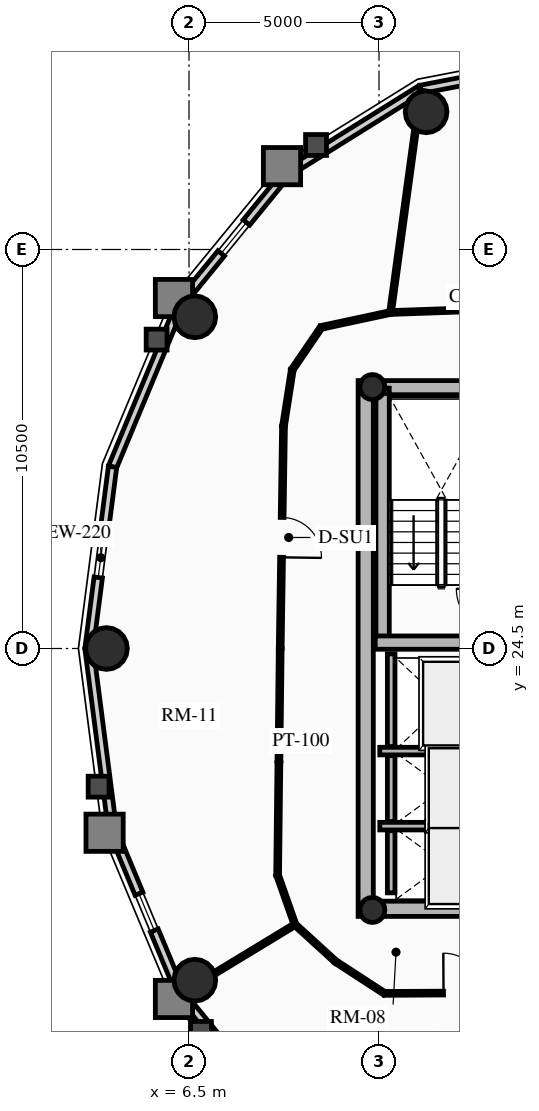
"""IFC4 building model, lengths in metres.
Left out: names, types, materials, properties, quantities, classifications, styles, units other than length and angle.
Written with IfcOpenShell. Run it as: python <this file> out.ifc"""

import sys

from ifc_helpers import new_model, si_unit, direction, frame, frame_2d, origin, origin_2d, place, context, subcontext, project, spatial, rectangle, circle, hollow_circle, extrude, source, transform, mapped, element, fill, save


model = new_model("IFC4")
c1 = context("Model", 3, precision=1e-05, world=origin(), true_north=direction((0.0, 1.0)))
c2 = subcontext(c1, "Body", "Model", "MODEL_VIEW")
j1 = project(units=[si_unit("LENGTHUNIT", "METRE"), si_unit("PLANEANGLEUNIT", "RADIAN")], contexts=[c1])
p1 = place(None, origin())
s1 = spatial("IfcSite", under=j1, at=p1, CompositionType="ELEMENT")
p2 = place(p1, origin())
s2 = spatial("IfcBuilding", under=s1, at=p2, CompositionType="ELEMENT")
p3 = place(p2, frame((0.0, 0.0, 196.66)))
s3 = spatial("IfcBuildingStorey", under=s2, at=p3, CompositionType="ELEMENT", Elevation=196.66)
p4 = place(p3, frame((11.15, 17.45, 0.0), z_axis=(0.0, 0.0, 1.0), x_axis=(0.0, 1.0, 0.0)))
e1 = element("IfcWall", 1, at=p4, inside=s3, PredefinedType="SHEAR", context=c2, shape_type="SweptSolid", body=[
    extrude(rectangle(XDim=14.1, YDim=0.4, at=frame_2d((7.05, 0.0))), origin(), (0.0, 0.0, 1.0), 2.91),
])
p5 = place(p3, frame((11.15, 17.65, 0.0), z_axis=(0.0, 0.0, 1.0), x_axis=(1.0, 0.0, 0.0)))
e2 = element("IfcWall", 2, at=p5, inside=s3, PredefinedType="SHEAR", context=c2, shape_type="SweptSolid", body=[
    extrude(rectangle(XDim=10.7, YDim=0.4, at=frame_2d((5.35, 0.0))), origin(), (0.0, 0.0, 1.0), 2.91),
])
m1 = source(origin(), c2, "Body", "SweptSolid", [
    extrude(rectangle(XDim=1.5, YDim=2.02, at=frame_2d((0.75, 1.01))), frame((0.0, 0.21, 0.0), z_axis=(0.0, -1.0, 0.0), x_axis=(1.0, 0.0, 0.0)), (0.0, 0.0, 1.0), 0.42),
])
p6 = place(p5, frame((5.45, 0.0, 0.0)))
e3 = element("IfcOpeningElement", 3, at=p6, cuts=e2, PredefinedType="OPENING", context=c2, shape_type="MappedRepresentation", body=[
    mapped(m1, transform((0.0, 0.0, 0.0), x_axis=(1.0, 0.0, 0.0), y_axis=(0.0, 1.0, 0.0), z_axis=(0.0, 0.0, 1.0), scale=1.0)),
])
p7 = place(p3, frame((11.15, 31.35, 0.0), z_axis=(0.0, 0.0, 1.0), x_axis=(1.0, 0.0, 0.0)))
e4 = element("IfcWall", 4, at=p7, inside=s3, PredefinedType="SHEAR", context=c2, shape_type="SweptSolid", body=[
    extrude(rectangle(XDim=10.7, YDim=0.4, at=frame_2d((5.35, 0.0))), origin(), (0.0, 0.0, 1.0), 2.91),
])
p8 = place(p7, frame((4.6, 0.0, 0.0)))
e5 = element("IfcOpeningElement", 5, at=p8, cuts=e4, PredefinedType="OPENING", context=c2, shape_type="MappedRepresentation", body=[
    mapped(m1, transform((0.0, 0.0, 0.0), x_axis=(1.0, 0.0, 0.0), y_axis=(0.0, 1.0, 0.0), z_axis=(0.0, 0.0, 1.0), scale=1.0)),
])
p9 = place(p3, frame((11.595, 24.655, 0.0), z_axis=(0.0, 0.0, 1.0), x_axis=(0.0, 1.0, 0.0)))
e6 = element("IfcWall", 6, at=p9, inside=s3, PredefinedType="SHEAR", context=c2, shape_type="SweptSolid", body=[
    extrude(rectangle(XDim=6.695, YDim=0.35, at=frame_2d((3.348, 0.0))), origin(), (0.0, 0.0, 1.0), 2.91),
])
p10 = place(p3, frame((11.4, 24.655, 0.0), z_axis=(0.0, 0.0, 1.0), x_axis=(1.0, 0.0, 0.0)))
e7 = element("IfcWall", 7, at=p10, inside=s3, PredefinedType="SHEAR", context=c2, shape_type="SweptSolid", body=[
    extrude(rectangle(XDim=3.285, YDim=0.35, at=frame_2d((1.643, 0.0))), origin(), (0.0, 0.0, 1.0), 2.91),
])
for number, where, z_axis, x_axis in (
    (8, (11.325, 17.62, 0.0), (0.0, 0.0, 1.0), (1.0, 0.0, 0.0)),
    (9, (11.325, 31.38, 0.0), (0.0, 0.0, 1.0), (1.0, 0.0, 0.0)),
):
    element("IfcColumn", number, at=place(p3, frame(where, z_axis=z_axis, x_axis=x_axis)), inside=s3, PredefinedType="COLUMN", context=c2, shape_type="SweptSolid", body=[
        extrude(hollow_circle(Radius=0.33, WallThickness=0.025, at=origin_2d()), origin(), (0.0, 0.0, 1.0), 2.91),
    ])
for number, where, z_axis, x_axis in (
    (10, (12.739, 38.623, 0.0), (0.0, 0.0, 1.0), (1.0, 0.0, 0.0)),
    (11, (6.653, 33.229, 0.0), (0.0, 0.0, 1.0), (1.0, 0.0, 0.0)),
    (12, (4.328, 24.5, 0.0), (0.0, 0.0, 1.0), (1.0, 0.0, 0.0)),
    (13, (6.653, 15.771, 0.0), (0.0, 0.0, 1.0), (1.0, 0.0, 0.0)),
):
    element("IfcColumn", number, at=place(p3, frame(where, z_axis=z_axis, x_axis=x_axis)), inside=s3, PredefinedType="USERDEFINED", context=c2, shape_type="SweptSolid", body=[
        extrude(circle(Radius=0.55, at=origin_2d()), origin(), (0.0, 0.0, 1.0), 2.91),
    ])
p11 = place(p3, frame((12.597, 39.213, 0.0), z_axis=(0.0, 0.0, 1.0), x_axis=(0.981700307484, 0.190432419211, 0.0)))
e14 = element("IfcWall", 14, at=p11, inside=s3, PredefinedType="SOLIDWALL", context=c2, shape_type="SweptSolid", body=[
    extrude(rectangle(XDim=3.976, YDim=0.22, at=frame_2d((1.988, 0.0))), origin(), (0.0, 0.0, 1.0), 2.322),
])
m2 = source(origin(), c2, "Body", "SweptSolid", [
    extrude(rectangle(XDim=1.05, YDim=1.3, at=frame_2d((0.525, 0.65))), frame((0.0, 0.12, 0.0), z_axis=(0.0, -1.0, 0.0), x_axis=(1.0, 0.0, 0.0)), (0.0, 0.0, 1.0), 0.24),
])
p12 = place(p11, frame((1.463, 0.0, 0.65)))
e15 = element("IfcOpeningElement", 15, at=p12, cuts=e14, PredefinedType="OPENING", context=c2, shape_type="MappedRepresentation", body=[
    mapped(m2, transform((0.0, 0.0, 0.0), x_axis=(1.0, 0.0, 0.0), y_axis=(0.0, 1.0, 0.0), z_axis=(0.0, 0.0, 1.0), scale=1.0)),
])
p13 = place(p3, frame((9.076, 37.015, 0.0), z_axis=(0.0, 0.0, 1.0), x_axis=(0.848318713376, 0.529485939886, 0.0)))
e16 = element("IfcWall", 16, at=p13, inside=s3, PredefinedType="SOLIDWALL", context=c2, shape_type="SweptSolid", body=[
    extrude(rectangle(XDim=4.15, YDim=0.22, at=frame_2d((2.075, 0.0))), origin(), (0.0, 0.0, 1.0), 2.322),
])
p14 = place(p3, frame((6.282, 33.593, 0.0), z_axis=(0.0, 0.0, 1.0), x_axis=(0.632467166636, 0.774587169483, 0.0)))
e17 = element("IfcWall", 17, at=p14, inside=s3, PredefinedType="SOLIDWALL", context=c2, shape_type="SweptSolid", body=[
    extrude(rectangle(XDim=4.418, YDim=0.22, at=frame_2d((2.209, 0.0))), origin(), (0.0, 0.0, 1.0), 2.322),
])
p15 = place(p14, frame((1.684, 0.0, 0.65)))
e18 = element("IfcOpeningElement", 18, at=p15, cuts=e17, PredefinedType="OPENING", context=c2, shape_type="MappedRepresentation", body=[
    mapped(m2, transform((0.0, 0.0, 0.0), x_axis=(1.0, 0.0, 0.0), y_axis=(0.0, 1.0, 0.0), z_axis=(0.0, 0.0, 1.0), scale=1.0)),
])
p16 = place(p3, frame((4.488, 29.281, 0.0), z_axis=(0.0, 0.0, 1.0), x_axis=(0.384036305194, 0.923317993052, 0.0)))
e19 = element("IfcWall", 19, at=p16, inside=s3, PredefinedType="SOLIDWALL", context=c2, shape_type="SweptSolid", body=[
    extrude(rectangle(XDim=4.671, YDim=0.22, at=frame_2d((2.335, 0.0))), origin(), (0.0, 0.0, 1.0), 2.322),
])
p17 = place(p3, frame((3.87, 24.5, 0.0), z_axis=(0.0, 0.0, 1.0), x_axis=(0.128241318541, 0.991742993027, 0.0)))
e20 = element("IfcWall", 20, at=p17, inside=s3, PredefinedType="SOLIDWALL", context=c2, shape_type="SweptSolid", body=[
    extrude(rectangle(XDim=4.82, YDim=0.22, at=frame_2d((2.41, 0.0))), origin(), (0.0, 0.0, 1.0), 2.322),
])
p18 = place(p17, frame((1.885, 0.0, 0.65)))
e21 = element("IfcOpeningElement", 21, at=p18, cuts=e20, PredefinedType="OPENING", context=c2, shape_type="MappedRepresentation", body=[
    mapped(m2, transform((0.0, 0.0, 0.0), x_axis=(1.0, 0.0, 0.0), y_axis=(0.0, 1.0, 0.0), z_axis=(0.0, 0.0, 1.0), scale=1.0)),
])
p19 = place(p3, frame((4.488, 19.719, 0.0), z_axis=(0.0, 0.0, 1.0), x_axis=(-0.128241318541, 0.991742993027, 0.0)))
e22 = element("IfcWall", 22, at=p19, inside=s3, PredefinedType="SOLIDWALL", context=c2, shape_type="SweptSolid", body=[
    extrude(rectangle(XDim=4.82, YDim=0.22, at=frame_2d((2.41, 0.0))), origin(), (0.0, 0.0, 1.0), 2.322),
])
p20 = place(p3, frame((6.282, 15.407, 0.0), z_axis=(0.0, 0.0, 1.0), x_axis=(-0.384036305194, 0.923317993052, 0.0)))
e23 = element("IfcWall", 23, at=p20, inside=s3, PredefinedType="SOLIDWALL", context=c2, shape_type="SweptSolid", body=[
    extrude(rectangle(XDim=4.671, YDim=0.22, at=frame_2d((2.335, 0.0))), origin(), (0.0, 0.0, 1.0), 2.322),
])
p21 = place(p20, frame((1.81, 0.0, 0.65)))
e24 = element("IfcOpeningElement", 24, at=p21, cuts=e23, PredefinedType="OPENING", context=c2, shape_type="MappedRepresentation", body=[
    mapped(m2, transform((0.0, 0.0, 0.0), x_axis=(1.0, 0.0, 0.0), y_axis=(0.0, 1.0, 0.0), z_axis=(0.0, 0.0, 1.0), scale=1.0)),
])
p22 = place(p3, frame((9.076, 11.985, 0.0), z_axis=(0.0, 0.0, 1.0), x_axis=(-0.632467166636, 0.774587169483, 0.0)))
e25 = element("IfcWall", 25, at=p22, inside=s3, PredefinedType="SOLIDWALL", context=c2, shape_type="SweptSolid", body=[
    extrude(rectangle(XDim=4.418, YDim=0.22, at=frame_2d((2.209, 0.0))), origin(), (0.0, 0.0, 1.0), 2.322),
])
p23 = place(p3, frame((11.52, 21.8, 0.0), z_axis=(0.0, 0.0, 1.0), x_axis=(1.0, 0.0, 0.0)))
e26 = element("IfcWall", 26, at=p23, inside=s3, PredefinedType="SHEAR", context=c2, shape_type="SweptSolid", body=[
    extrude(rectangle(XDim=2.97, YDim=0.2, at=frame_2d((1.485, 0.0))), origin(), (0.0, 0.0, 1.0), 2.91),
])
p24 = place(p3, frame((11.82, 21.92, 0.0), z_axis=(0.0, 0.0, 1.0), x_axis=(0.0, 1.0, 0.0)))
e27 = element("IfcWall", 27, at=p24, inside=s3, PredefinedType="SHEAR", context=c2, shape_type="SweptSolid", body=[
    extrude(rectangle(XDim=2.44, YDim=0.2, at=frame_2d((1.22, 0.0))), origin(), (0.0, 0.0, 1.0), 2.91),
])
p25 = place(p3, frame((11.52, 19.825, 0.0), z_axis=(0.0, 0.0, 1.0), x_axis=(1.0, 0.0, 0.0)))
e28 = element("IfcWall", 28, at=p25, inside=s3, PredefinedType="SHEAR", context=c2, shape_type="SweptSolid", body=[
    extrude(rectangle(XDim=2.97, YDim=0.2, at=frame_2d((1.485, 0.0))), origin(), (0.0, 0.0, 1.0), 2.91),
])
p26 = place(p3, frame((11.82, 19.945, 0.0), z_axis=(0.0, 0.0, 1.0), x_axis=(0.0, 1.0, 0.0)))
e29 = element("IfcWall", 29, at=p26, inside=s3, PredefinedType="SHEAR", context=c2, shape_type="SweptSolid", body=[
    extrude(rectangle(XDim=1.735, YDim=0.2, at=frame_2d((0.867, 0.0))), origin(), (0.0, 0.0, 1.0), 2.91),
])
p27 = place(p3, frame((11.82, 18.07, 0.0), z_axis=(0.0, 0.0, 1.0), x_axis=(0.0, 1.0, 0.0)))
e30 = element("IfcWall", 30, at=p27, inside=s3, PredefinedType="SHEAR", context=c2, shape_type="SweptSolid", body=[
    extrude(rectangle(XDim=1.635, YDim=0.2, at=frame_2d((0.817, 0.0))), origin(), (0.0, 0.0, 1.0), 2.91),
])
p28 = place(p3, frame((18.082, 33.56, 0.0), z_axis=(0.0, 0.0, 1.0), x_axis=(-0.999399009709, -0.034664382185, 0.0)))
e31 = element("IfcWall", 31, at=p28, inside=s3, PredefinedType="MOVABLE", context=c2, shape_type="SweptSolid", body=[
    extrude(rectangle(XDim=6.282, YDim=0.1, at=frame_2d((3.141, 0.0))), origin(), (0.0, 0.0, 1.0), 2.255),
])
p29 = place(p3, frame((11.803, 33.342, 0.0), z_axis=(0.0, 0.0, 1.0), x_axis=(-0.977750742783, -0.209770076483, 0.0)))
e32 = element("IfcWall", 32, at=p29, inside=s3, PredefinedType="MOVABLE", context=c2, shape_type="SweptSolid", body=[
    extrude(rectangle(XDim=1.868, YDim=0.1, at=frame_2d((0.934, 0.0))), origin(), (0.0, 0.0, 1.0), 2.255),
])
p30 = place(p3, frame((9.977, 32.95, 0.0), z_axis=(0.0, 0.0, 1.0), x_axis=(-0.563291804539, -0.826258036535, 0.0)))
e33 = element("IfcWall", 33, at=p30, inside=s3, PredefinedType="MOVABLE", context=c2, shape_type="SweptSolid", body=[
    extrude(rectangle(XDim=1.346, YDim=0.1, at=frame_2d((0.673, 0.0))), origin(), (0.0, 0.0, 1.0), 2.322),
])
p31 = place(p3, frame((9.219, 31.838, 0.0), z_axis=(0.0, 0.0, 1.0), x_axis=(-0.154065528966, -0.98806063214, 0.0)))
e34 = element("IfcWall", 34, at=p31, inside=s3, PredefinedType="MOVABLE", context=c2, shape_type="SweptSolid", body=[
    extrude(rectangle(XDim=1.507, YDim=0.1, at=frame_2d((0.753, 0.0))), origin(), (0.0, 0.0, 1.0), 2.255),
])
p32 = place(p3, frame((8.986, 30.349, 0.0), z_axis=(0.0, 0.0, 1.0), x_axis=(-0.014775478218, -0.999890836663, 0.0)))
e35 = element("IfcWall", 35, at=p32, inside=s3, PredefinedType="MOVABLE", context=c2, shape_type="SweptSolid", body=[
    extrude(rectangle(XDim=5.849, YDim=0.1, at=frame_2d((2.925, 0.0))), origin(), (0.0, 0.0, 1.0), 2.685),
])
m3 = source(origin(), c2, "Body", "SweptSolid", [
    extrude(rectangle(XDim=1.05, YDim=2.015, at=frame_2d((0.525, 1.007))), frame((0.0, 0.06, 0.0), z_axis=(0.0, -1.0, 0.0), x_axis=(1.0, 0.0, 0.0)), (0.0, 0.0, 1.0), 0.12),
])
p33 = place(p32, frame((2.4, 0.0, 0.0)))
e36 = element("IfcOpeningElement", 36, at=p33, cuts=e35, PredefinedType="OPENING", context=c2, shape_type="MappedRepresentation", body=[
    mapped(m3, transform((0.0, 0.0, 0.0), x_axis=(1.0, 0.0, 0.0), y_axis=(0.0, 1.0, 0.0), z_axis=(0.0, 0.0, 1.0), scale=1.0)),
])
p34 = place(p3, frame((8.9, 24.5, 0.0), z_axis=(0.0, 0.0, 1.0), x_axis=(-0.011416369353, -0.999934831132, 0.0)))
e37 = element("IfcWall", 37, at=p34, inside=s3, PredefinedType="MOVABLE", context=c2, shape_type="SweptSolid", body=[
    extrude(rectangle(XDim=5.967, YDim=0.1, at=frame_2d((2.983, 0.0))), origin(), (0.0, 0.0, 1.0), 2.322),
])
p35 = place(p3, frame((8.832, 18.534, 0.0), z_axis=(0.0, 0.0, 1.0), x_axis=(0.332031819657, -0.943268186008, 0.0)))
e38 = element("IfcWall", 38, at=p35, inside=s3, PredefinedType="MOVABLE", context=c2, shape_type="SweptSolid", body=[
    extrude(rectangle(XDim=1.377, YDim=0.1, at=frame_2d((0.688, 0.0))), origin(), (0.0, 0.0, 1.0), 2.255),
])
p36 = place(p3, frame((9.289, 17.235, 0.0), z_axis=(0.0, 0.0, 1.0), x_axis=(0.739015164946, -0.673688790155, 0.0)))
e39 = element("IfcWall", 39, at=p36, inside=s3, PredefinedType="MOVABLE", context=c2, shape_type="SweptSolid", body=[
    extrude(rectangle(XDim=1.446, YDim=0.1, at=frame_2d((0.723, 0.0))), origin(), (0.0, 0.0, 1.0), 2.322),
])
p37 = place(p3, frame((10.358, 16.26, 0.0), z_axis=(0.0, 0.0, 1.0), x_axis=(0.838265397059, -0.545262435983, 0.0)))
e40 = element("IfcWall", 40, at=p37, inside=s3, PredefinedType="MOVABLE", context=c2, shape_type="SweptSolid", body=[
    extrude(rectangle(XDim=1.534, YDim=0.1, at=frame_2d((0.767, 0.0))), origin(), (0.0, 0.0, 1.0), 2.255),
])
p38 = place(p3, frame((11.644, 15.424, 0.0), z_axis=(0.0, 0.0, 1.0), x_axis=(0.999986552511, 0.005186019339, 0.0)))
e41 = element("IfcWall", 41, at=p38, inside=s3, PredefinedType="MOVABLE", context=c2, shape_type="SweptSolid", body=[
    extrude(rectangle(XDim=3.201, YDim=0.1, at=frame_2d((1.601, 0.0))), origin(), (0.0, 0.0, 1.0), 2.322),
])
p39 = place(p38, frame((1.553, 0.0, 0.0)))
e42 = element("IfcOpeningElement", 42, at=p39, cuts=e41, PredefinedType="OPENING", context=c2, shape_type="MappedRepresentation", body=[
    mapped(m3, transform((0.0, 0.0, 0.0), x_axis=(1.0, 0.0, 0.0), y_axis=(0.0, 1.0, 0.0), z_axis=(0.0, 0.0, 1.0), scale=1.0)),
])
p40 = place(p3, frame((11.803, 33.342, 0.0), z_axis=(0.0, 0.0, 1.0), x_axis=(0.135452591041, 0.990783828885, 0.0)))
e43 = element("IfcWall", 43, at=p40, inside=s3, PredefinedType="MOVABLE", context=c2, shape_type="SweptSolid", body=[
    extrude(rectangle(XDim=5.906, YDim=0.1, at=frame_2d((2.953, 0.0))), origin(), (0.0, 0.0, 1.0), 2.322),
])
p41 = place(p3, frame((9.289, 17.235, 0.0), z_axis=(0.0, 0.0, 1.0), x_axis=(-0.854741081983, -0.519054604806, 0.0)))
e44 = element("IfcWall", 44, at=p41, inside=s3, PredefinedType="MOVABLE", context=c2, shape_type="SweptSolid", body=[
    extrude(rectangle(XDim=3.499, YDim=0.1, at=frame_2d((1.75, 0.0))), origin(), (0.0, 0.0, 1.0), 2.322),
])
m4 = source(origin(), c2, "Body", "SweptSolid", [
    extrude(rectangle(XDim=1.05, YDim=1.3, at=frame_2d((0.525, 0.65))), frame((0.0, 0.03, 0.0), z_axis=(0.0, -1.0, 0.0), x_axis=(1.0, 0.0, 0.0)), (0.0, 0.0, 1.0), 0.06),
])
p42 = place(p15, origin())
e45 = element("IfcWindow", 45, at=p42, inside=s3, PartitioningType="SINGLE_PANEL", PredefinedType="WINDOW", context=c2, shape_type="MappedRepresentation", body=[
    mapped(m4, transform((0.0, 0.0, 0.0), x_axis=(1.0, 0.0, 0.0), y_axis=(0.0, 1.0, 0.0), z_axis=(0.0, 0.0, 1.0), scale=1.0)),
])
fill(e18, e45)
p43 = place(p18, origin())
e46 = element("IfcWindow", 46, at=p43, inside=s3, PartitioningType="SINGLE_PANEL", PredefinedType="WINDOW", context=c2, shape_type="MappedRepresentation", body=[
    mapped(m4, transform((0.0, 0.0, 0.0), x_axis=(1.0, 0.0, 0.0), y_axis=(0.0, 1.0, 0.0), z_axis=(0.0, 0.0, 1.0), scale=1.0)),
])
fill(e21, e46)
p44 = place(p21, origin())
e47 = element("IfcWindow", 47, at=p44, inside=s3, PartitioningType="SINGLE_PANEL", PredefinedType="WINDOW", context=c2, shape_type="MappedRepresentation", body=[
    mapped(m4, transform((0.0, 0.0, 0.0), x_axis=(1.0, 0.0, 0.0), y_axis=(0.0, 1.0, 0.0), z_axis=(0.0, 0.0, 1.0), scale=1.0)),
])
fill(e24, e47)
m5 = source(origin(), c2, "Body", "SweptSolid", [
    extrude(rectangle(XDim=1.05, YDim=2.015, at=frame_2d((0.525, 1.007))), frame((0.0, 0.025, 0.0), z_axis=(0.0, -1.0, 0.0), x_axis=(1.0, 0.0, 0.0)), (0.0, 0.0, 1.0), 0.05),
])
p45 = place(p33, origin())
e48 = element("IfcDoor", 48, at=p45, inside=s3, OperationType="SINGLE_SWING_RIGHT", PredefinedType="DOOR", context=c2, shape_type="MappedRepresentation", body=[
    mapped(m5, transform((0.0, 0.0, 0.0), x_axis=(1.0, 0.0, 0.0), y_axis=(0.0, 1.0, 0.0), z_axis=(0.0, 0.0, 1.0), scale=1.0)),
])
fill(e36, e48)
p46 = place(p39, origin())
e49 = element("IfcDoor", 49, at=p46, inside=s3, OperationType="SINGLE_SWING_LEFT", PredefinedType="DOOR", context=c2, shape_type="MappedRepresentation", body=[
    mapped(m5, transform((0.0, 0.0, 0.0), x_axis=(1.0, 0.0, 0.0), y_axis=(0.0, 1.0, 0.0), z_axis=(0.0, 0.0, 1.0), scale=1.0)),
])
fill(e42, e49)
save(model, sys.argv[1])
